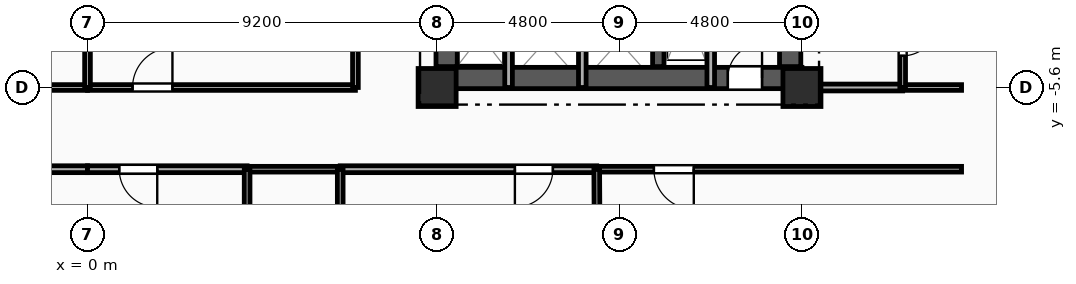
"""IFC4 building model, lengths in metres.
Left out: names, types, materials, properties, quantities, classifications, styles, units other than length and angle.
Written with IfcOpenShell. Run it as: python <this file> out.ifc"""

import sys

from ifc_helpers import new_model, si_unit, direction, frame, frame_2d, origin, origin_2d, place, context, subcontext, project, spatial, rectangle, extrude, element, fill, save


model = new_model("IFC4")
c1 = context("Model", 3, precision=1e-05, world=origin(), true_north=direction((0.0, 1.0)))
c2 = subcontext(c1, "Body", "Model", "MODEL_VIEW")
j1 = project(units=[si_unit("LENGTHUNIT", "METRE"), si_unit("PLANEANGLEUNIT", "RADIAN")], contexts=[c1])
p1 = place(None, origin())
s1 = spatial("IfcSite", under=j1, at=p1, CompositionType="ELEMENT")
p2 = place(p1, origin())
s2 = spatial("IfcBuilding", under=s1, at=p2, CompositionType="ELEMENT")
p3 = place(p2, frame((0.0, 0.0, 89.05)))
s3 = spatial("IfcBuildingStorey", under=s2, at=p3, CompositionType="ELEMENT", Elevation=89.05)
for number, where, z_axis, x_axis in (
    (1, (9.2, -5.6, 0.0), (0.0, 0.0, 1.0), (1.0, 0.0, 0.0)),
    (2, (18.8, -5.6, 0.0), (0.0, 0.0, 1.0), (1.0, 0.0, 0.0)),
):
    element("IfcColumn", number, at=place(p3, frame(where, z_axis=z_axis, x_axis=x_axis)), inside=s3, PredefinedType="COLUMN", context=c2, shape_type="SweptSolid", body=[
        extrude(rectangle(XDim=1.0, YDim=1.0, at=origin_2d()), origin(), (0.0, 0.0, 1.0), 3.35),
    ])
p4 = place(p3, frame((9.2, -5.35, 0.0), z_axis=(0.0, 0.0, 1.0), x_axis=(1.0, 0.0, 0.0)))
e3 = element("IfcWall", 3, at=p4, inside=s3, PredefinedType="SHEAR", context=c2, shape_type="SweptSolid", body=[
    extrude(rectangle(XDim=9.6, YDim=0.56, at=frame_2d((4.8, 0.0))), origin(), (0.0, 0.0, 1.0), 3.045),
])
p5 = place(p4, frame((7.65, 0.0, 0.0)))
e4 = element("IfcOpeningElement", 4, at=p5, cuts=e3, PredefinedType="OPENING", context=c2, shape_type="SweptSolid", body=[
    extrude(rectangle(XDim=0.9, YDim=2.1, at=frame_2d((0.45, 1.05))), frame((0.0, 0.29, 0.0), z_axis=(0.0, -1.0, 0.0), x_axis=(1.0, 0.0, 0.0)), (0.0, 0.0, 1.0), 0.58),
])
p6 = place(p3, frame((9.45, -5.05, 0.0), z_axis=(0.0, 0.0, 1.0), x_axis=(0.0, 1.0, 0.0)))
e5 = element("IfcWall", 5, at=p6, inside=s3, PredefinedType="SHEAR", context=c2, shape_type="SweptSolid", body=[
    extrude(rectangle(XDim=10.1, YDim=0.56, at=frame_2d((5.05, 0.0))), origin(), (0.0, 0.0, 1.0), 3.045),
])
p7 = place(p6, frame((7.15, 0.0, 0.0)))
e6 = element("IfcOpeningElement", 6, at=p7, cuts=e5, PredefinedType="OPENING", context=c2, shape_type="SweptSolid", body=[
    extrude(rectangle(XDim=0.9, YDim=2.1, at=frame_2d((0.45, 1.05))), frame((0.0, 0.29, 0.0), z_axis=(0.0, -1.0, 0.0), x_axis=(1.0, 0.0, 0.0)), (0.0, 0.0, 1.0), 0.58),
])
p8 = place(p6, frame((2.4, 0.0, 0.0)))
e7 = element("IfcOpeningElement", 7, at=p8, cuts=e5, PredefinedType="OPENING", context=c2, shape_type="SweptSolid", body=[
    extrude(rectangle(XDim=1.2, YDim=2.15, at=frame_2d((0.6, 1.075))), frame((0.0, 0.29, 0.0), z_axis=(0.0, -1.0, 0.0), x_axis=(1.0, 0.0, 0.0)), (0.0, 0.0, 1.0), 0.58),
])
p9 = place(p3, frame((18.49, -5.05, 0.0), z_axis=(0.0, 0.0, 1.0), x_axis=(0.0, 1.0, 0.0)))
e8 = element("IfcWall", 8, at=p9, inside=s3, PredefinedType="SHEAR", context=c2, shape_type="SweptSolid", body=[
    extrude(rectangle(XDim=10.1, YDim=0.56, at=frame_2d((5.05, 0.0))), origin(), (0.0, 0.0, 1.0), 3.045),
])
p10 = place(p3, frame((15.02, -5.05, 0.0), z_axis=(0.0, 0.0, 1.0), x_axis=(0.0, 1.0, 0.0)))
e9 = element("IfcWall", 9, at=p10, inside=s3, PredefinedType="SHEAR", context=c2, shape_type="SweptSolid", body=[
    extrude(rectangle(XDim=10.1, YDim=0.3, at=frame_2d((5.05, 0.0))), origin(), (0.0, 0.0, 1.0), 3.045),
])
p11 = place(p3, frame((16.4, -2.11, 0.0), z_axis=(0.0, 0.0, 1.0), x_axis=(0.0, -1.0, 0.0)))
e10 = element("IfcWall", 10, at=p11, inside=s3, PredefinedType="PARTITIONING", context=c2, shape_type="SweptSolid", body=[
    extrude(rectangle(XDim=3.49, YDim=0.2, at=frame_2d((1.745, 0.0))), origin(), (0.0, 0.0, 1.0), 3.045),
])
for number, where, z_axis, x_axis in (
    (11, (11.08, -5.6, 0.0), (0.0, 0.0, 1.0), (0.0, 1.0, 0.0)),
    (12, (13.02, -5.6, 0.0), (0.0, 0.0, 1.0), (0.0, 1.0, 0.0)),
):
    element("IfcWall", number, at=place(p3, frame(where, z_axis=z_axis, x_axis=x_axis)), inside=s3, PredefinedType="PARTITIONING", context=c2, shape_type="SweptSolid", body=[
        extrude(rectangle(XDim=2.25, YDim=0.2, at=frame_2d((1.125, 0.0))), origin(), (0.0, 0.0, 1.0), 3.045),
    ])
p12 = place(p3, frame((0.0, -7.75, 0.0), z_axis=(0.0, 0.0, 1.0), x_axis=(-1.0, 0.0, 0.0)))
e13 = element("IfcWall", 13, at=p12, inside=s3, PredefinedType="PARTITIONING", context=c2, shape_type="SweptSolid", body=[
    extrude(rectangle(XDim=2.55, YDim=0.18, at=frame_2d((1.275, 0.0))), origin(), (0.0, 0.0, 1.0), 3.045),
])
p13 = place(p3, frame((-7.05, -5.6, 0.0), z_axis=(0.0, 0.0, 1.0), x_axis=(1.0, 0.0, 0.0)))
e14 = element("IfcWall", 14, at=p13, inside=s3, PredefinedType="PARTITIONING", context=c2, shape_type="SweptSolid", body=[
    extrude(rectangle(XDim=7.05, YDim=0.15, at=frame_2d((3.525, 0.0))), origin(), (0.0, 0.0, 1.0), 2.53),
])
p14 = place(p3, frame((18.8, -5.6, 0.0), z_axis=(0.0, 0.0, 1.0), x_axis=(1.0, 0.0, 0.0)))
e15 = element("IfcWall", 15, at=p14, inside=s3, PredefinedType="PARTITIONING", context=c2, shape_type="SweptSolid", body=[
    extrude(rectangle(XDim=2.65, YDim=0.18, at=frame_2d((1.325, 0.0))), origin(), (0.0, 0.0, 1.0), 2.53),
])
p15 = place(p3, frame((21.45, -5.6, 0.0), z_axis=(0.0, 0.0, 1.0), x_axis=(1.0, 0.0, 0.0)))
e16 = element("IfcWall", 16, at=p15, inside=s3, PredefinedType="PLUMBINGWALL", context=c2, shape_type="SweptSolid", body=[
    extrude(rectangle(XDim=1.55, YDim=0.15, at=frame_2d((0.775, 0.0))), origin(), (0.0, 0.0, 1.0), 3.045),
])
p16 = place(p3, frame((4.2, -7.75, 0.0), z_axis=(0.0, 0.0, 1.0), x_axis=(-1.0, 0.0, 0.0)))
e17 = element("IfcWall", 17, at=p16, inside=s3, PredefinedType="PARTITIONING", context=c2, shape_type="SweptSolid", body=[
    extrude(rectangle(XDim=4.2, YDim=0.18, at=frame_2d((2.1, 0.0))), origin(), (0.0, 0.0, 1.0), 3.045),
])
p17 = place(p16, frame((2.365, 0.0, 0.0)))
e18 = element("IfcOpeningElement", 18, at=p17, cuts=e17, PredefinedType="OPENING", context=c2, shape_type="SweptSolid", body=[
    extrude(rectangle(XDim=1.0, YDim=2.15, at=frame_2d((0.5, 1.075))), frame((0.0, 0.1, 0.0), z_axis=(0.0, -1.0, 0.0), x_axis=(1.0, 0.0, 0.0)), (0.0, 0.0, 1.0), 0.2),
])
p18 = place(p3, frame((13.4, -7.75, 0.0), z_axis=(0.0, 0.0, 1.0), x_axis=(-1.0, 0.0, 0.0)))
e19 = element("IfcWall", 19, at=p18, inside=s3, PredefinedType="PARTITIONING", context=c2, shape_type="SweptSolid", body=[
    extrude(rectangle(XDim=6.75, YDim=0.18, at=frame_2d((3.375, 0.0))), origin(), (0.0, 0.0, 1.0), 3.045),
])
p19 = place(p18, frame((1.154, 0.0, 0.0)))
e20 = element("IfcOpeningElement", 20, at=p19, cuts=e19, PredefinedType="OPENING", context=c2, shape_type="SweptSolid", body=[
    extrude(rectangle(XDim=1.0, YDim=2.15, at=frame_2d((0.5, 1.075))), frame((0.0, 0.1, 0.0), z_axis=(0.0, -1.0, 0.0), x_axis=(1.0, 0.0, 0.0)), (0.0, 0.0, 1.0), 0.2),
])
p20 = place(p3, frame((6.65, -7.75, 0.0), z_axis=(0.0, 0.0, 1.0), x_axis=(-1.0, 0.0, 0.0)))
e21 = element("IfcWall", 21, at=p20, inside=s3, PredefinedType="PLUMBINGWALL", context=c2, shape_type="SweptSolid", body=[
    extrude(rectangle(XDim=2.45, YDim=0.15, at=frame_2d((1.225, 0.0))), origin(), (0.0, 0.0, 1.0), 3.045),
])
p21 = place(p3, frame((23.0, -7.75, 0.0), z_axis=(0.0, 0.0, 1.0), x_axis=(-1.0, 0.0, 0.0)))
e22 = element("IfcWall", 22, at=p21, inside=s3, PredefinedType="PARTITIONING", context=c2, shape_type="SweptSolid", body=[
    extrude(rectangle(XDim=9.6, YDim=0.15, at=frame_2d((4.8, 0.0))), origin(), (0.0, 0.0, 1.0), 3.045),
])
p22 = place(p21, frame((7.046, 0.0, 0.0)))
e23 = element("IfcOpeningElement", 23, at=p22, cuts=e22, PredefinedType="OPENING", context=c2, shape_type="SweptSolid", body=[
    extrude(rectangle(XDim=1.05, YDim=2.15, at=frame_2d((0.525, 1.075))), frame((0.0, 0.085, 0.0), z_axis=(0.0, -1.0, 0.0), x_axis=(1.0, 0.0, 0.0)), (0.0, 0.0, 1.0), 0.17),
])
p23 = place(p3, frame((0.0, -5.6, 0.0), z_axis=(0.0, 0.0, 1.0), x_axis=(1.0, 0.0, 0.0)))
e24 = element("IfcWall", 24, at=p23, inside=s3, PredefinedType="PARTITIONING", context=c2, shape_type="SweptSolid", body=[
    extrude(rectangle(XDim=7.05, YDim=0.15, at=frame_2d((3.525, 0.0))), origin(), (0.0, 0.0, 1.0), 2.53),
])
p24 = place(p23, frame((1.185, 0.0, 0.0)))
e25 = element("IfcOpeningElement", 25, at=p24, cuts=e24, PredefinedType="OPENING", context=c2, shape_type="SweptSolid", body=[
    extrude(rectangle(XDim=1.05, YDim=2.15, at=frame_2d((0.525, 1.075))), frame((0.0, 0.085, 0.0), z_axis=(0.0, -1.0, 0.0), x_axis=(1.0, 0.0, 0.0)), (0.0, 0.0, 1.0), 0.17),
])
p25 = place(p3, frame((7.05, -5.6, 0.0), z_axis=(0.0, 0.0, 1.0), x_axis=(0.0, 1.0, 0.0)))
e26 = element("IfcWall", 26, at=p25, inside=s3, PredefinedType="PARTITIONING", context=c2, shape_type="SweptSolid", body=[
    extrude(rectangle(XDim=7.05, YDim=0.15, at=frame_2d((3.525, 0.0))), origin(), (0.0, 0.0, 1.0), 3.045),
])
p26 = place(p3, frame((21.45, -3.25, 0.0), z_axis=(0.0, 0.0, 1.0), x_axis=(0.0, -1.0, 0.0)))
e27 = element("IfcWall", 27, at=p26, inside=s3, PredefinedType="PLUMBINGWALL", context=c2, shape_type="SweptSolid", body=[
    extrude(rectangle(XDim=2.35, YDim=0.15, at=frame_2d((1.175, 0.0))), origin(), (0.0, 0.0, 1.0), 3.045),
])
p27 = place(p26, frame((0.616, 0.0, 0.0)))
e28 = element("IfcOpeningElement", 28, at=p27, cuts=e27, PredefinedType="OPENING", context=c2, shape_type="SweptSolid", body=[
    extrude(rectangle(XDim=0.9, YDim=2.1, at=frame_2d((0.45, 1.05))), frame((0.0, 0.085, 0.0), z_axis=(0.0, -1.0, 0.0), x_axis=(1.0, 0.0, 0.0)), (0.0, 0.0, 1.0), 0.17),
])
for number, where, z_axis, x_axis in (
    (29, (4.2, -7.75, 0.0), (0.0, 0.0, 1.0), (0.0, -1.0, 0.0)),
    (30, (6.65, -9.9, 0.0), (0.0, 0.0, 1.0), (0.0, 1.0, 0.0)),
):
    element("IfcWall", number, at=place(p3, frame(where, z_axis=z_axis, x_axis=x_axis)), inside=s3, PredefinedType="PLUMBINGWALL", context=c2, shape_type="SweptSolid", body=[
        extrude(rectangle(XDim=2.15, YDim=0.15, at=frame_2d((1.075, 0.0))), origin(), (0.0, 0.0, 1.0), 3.045),
    ])
p28 = place(p3, frame((13.4, -7.75, 0.0), z_axis=(0.0, 0.0, 1.0), x_axis=(0.005487554946, -0.999984943257, 0.0)))
e31 = element("IfcWall", 31, at=p28, inside=s3, PredefinedType="PARTITIONING", context=c2, shape_type="SweptSolid", body=[
    extrude(rectangle(XDim=8.008, YDim=0.15, at=frame_2d((4.004, 0.0))), origin(), (0.0, 0.0, 1.0), 3.045),
])
p29 = place(p3, frame((0.0, 1.45, 0.0), z_axis=(0.0, 0.0, 1.0), x_axis=(0.0, -1.0, 0.0)))
e32 = element("IfcWall", 32, at=p29, inside=s3, PredefinedType="PARTITIONING", context=c2, shape_type="SweptSolid", body=[
    extrude(rectangle(XDim=7.05, YDim=0.15, at=frame_2d((3.525, 0.0))), origin(), (0.0, 0.0, 1.0), 3.045),
])
p30 = place(p5, origin())
e33 = element("IfcDoor", 33, at=p30, inside=s3, OperationType="SINGLE_SWING_RIGHT", PredefinedType="DOOR", context=c2, shape_type="SweptSolid", body=[
    extrude(rectangle(XDim=0.9, YDim=2.1, at=frame_2d((0.45, 1.05))), frame((0.0, 0.025, 0.0), z_axis=(0.0, -1.0, 0.0), x_axis=(1.0, 0.0, 0.0)), (0.0, 0.0, 1.0), 0.05),
])
fill(e4, e33)
p31 = place(p17, origin())
e34 = element("IfcDoor", 34, at=p31, inside=s3, OperationType="SINGLE_SWING_LEFT", PredefinedType="DOOR", context=c2, shape_type="SweptSolid", body=[
    extrude(rectangle(XDim=1.0, YDim=2.15, at=frame_2d((0.5, 1.075))), frame((0.0, 0.025, 0.0), z_axis=(0.0, -1.0, 0.0), x_axis=(1.0, 0.0, 0.0)), (0.0, 0.0, 1.0), 0.05),
])
fill(e18, e34)
p32 = place(p19, origin())
e35 = element("IfcDoor", 35, at=p32, inside=s3, OperationType="SINGLE_SWING_RIGHT", PredefinedType="DOOR", context=c2, shape_type="SweptSolid", body=[
    extrude(rectangle(XDim=1.0, YDim=2.15, at=frame_2d((0.5, 1.075))), frame((0.0, 0.025, 0.0), z_axis=(0.0, -1.0, 0.0), x_axis=(1.0, 0.0, 0.0)), (0.0, 0.0, 1.0), 0.05),
])
fill(e20, e35)
p33 = place(p22, origin())
e36 = element("IfcDoor", 36, at=p33, inside=s3, OperationType="SINGLE_SWING_LEFT", PredefinedType="DOOR", context=c2, shape_type="SweptSolid", body=[
    extrude(rectangle(XDim=1.05, YDim=2.15, at=frame_2d((0.525, 1.075))), frame((0.0, 0.025, 0.0), z_axis=(0.0, -1.0, 0.0), x_axis=(1.0, 0.0, 0.0)), (0.0, 0.0, 1.0), 0.05),
])
fill(e23, e36)
p34 = place(p24, origin())
e37 = element("IfcDoor", 37, at=p34, inside=s3, OperationType="SINGLE_SWING_RIGHT", PredefinedType="DOOR", context=c2, shape_type="SweptSolid", body=[
    extrude(rectangle(XDim=1.05, YDim=2.15, at=frame_2d((0.525, 1.075))), frame((0.0, 0.025, 0.0), z_axis=(0.0, -1.0, 0.0), x_axis=(1.0, 0.0, 0.0)), (0.0, 0.0, 1.0), 0.05),
])
fill(e25, e37)
p35 = place(p27, origin())
e38 = element("IfcDoor", 38, at=p35, inside=s3, OperationType="SINGLE_SWING_LEFT", PredefinedType="DOOR", context=c2, shape_type="SweptSolid", body=[
    extrude(rectangle(XDim=0.9, YDim=2.1, at=frame_2d((0.45, 1.05))), frame((0.0, 0.025, 0.0), z_axis=(0.0, -1.0, 0.0), x_axis=(1.0, 0.0, 0.0)), (0.0, 0.0, 1.0), 0.05),
])
fill(e28, e38)
save(model, sys.argv[1])
